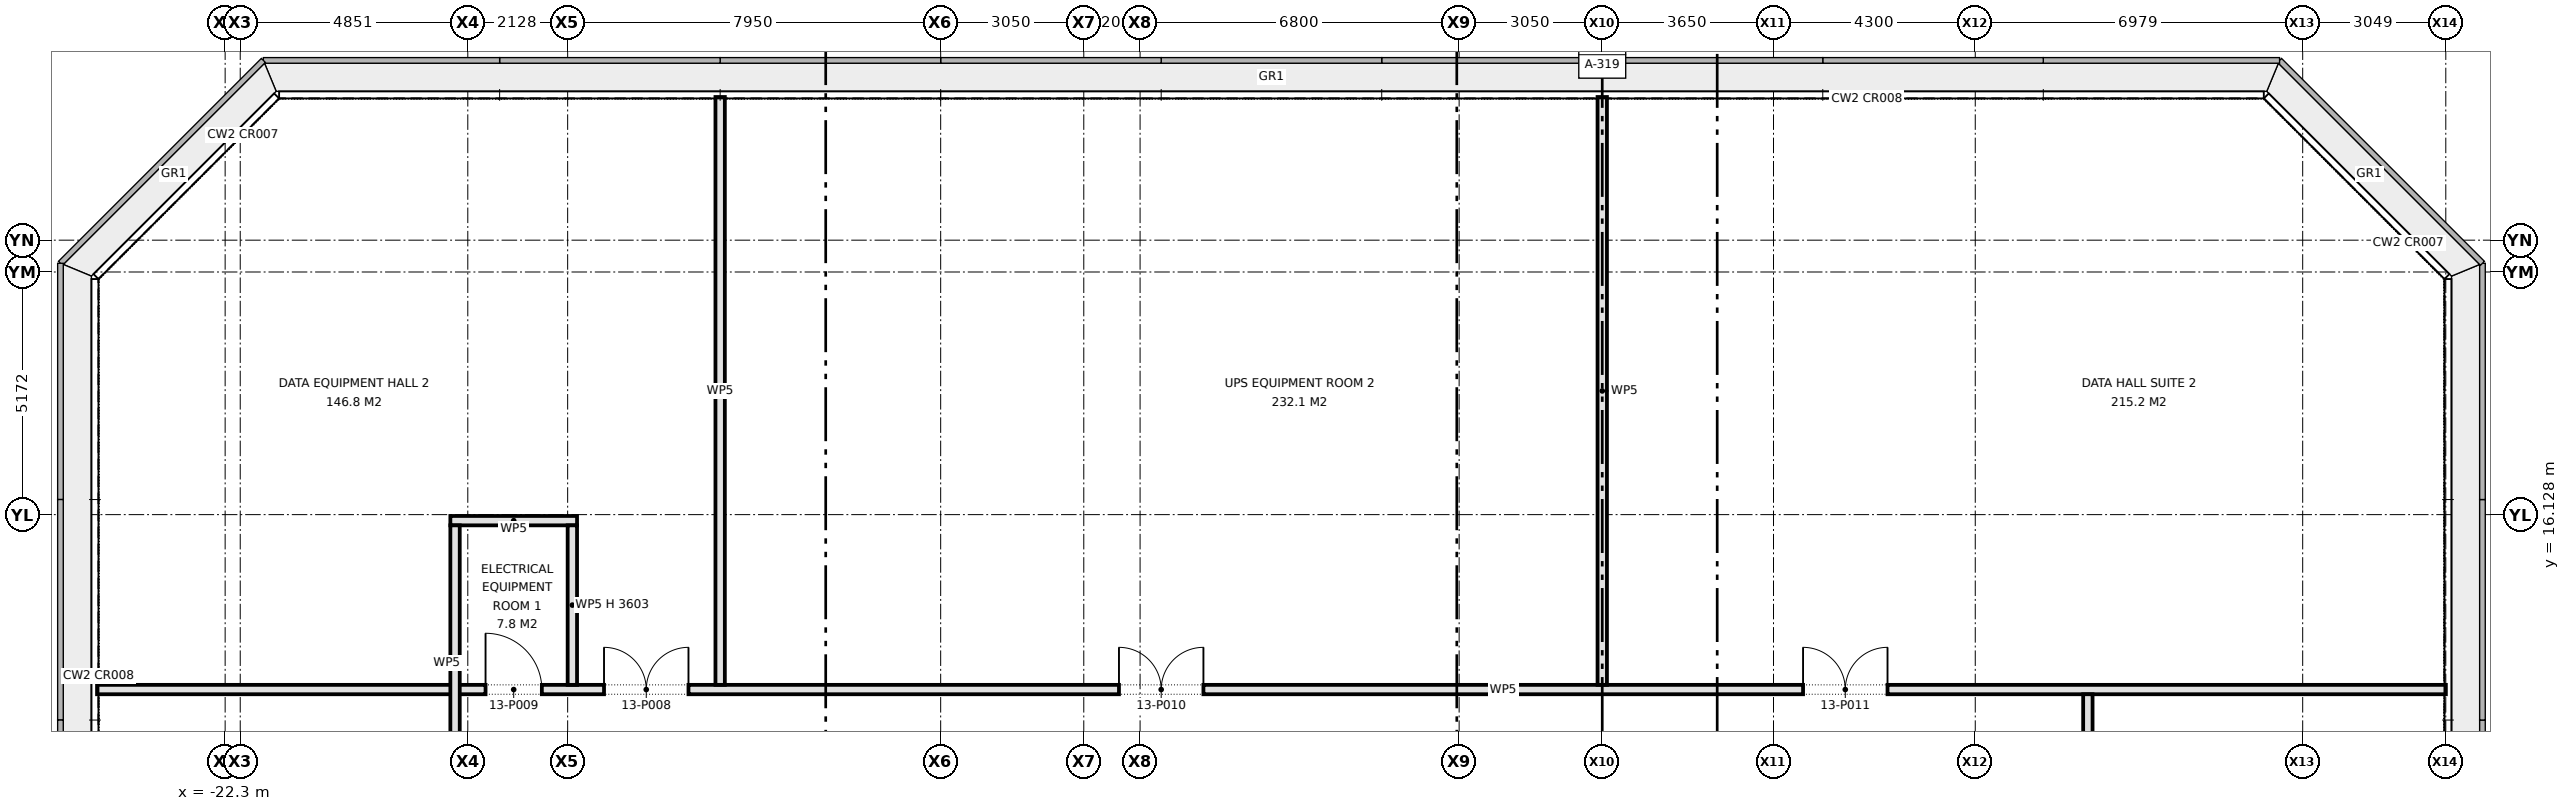
"""IFC4 building model, lengths in metres.
Left out: names, types, materials, properties, quantities, classifications, styles, units other than length and angle.
Written with IfcOpenShell. Run it as: python <this file> out.ifc"""

import sys

from ifc_helpers import new_model, si_unit, direction, frame, frame_2d, origin, place, context, subcontext, project, spatial, rectangle, extrude, element, fill, save


model = new_model("IFC4")
c1 = context("Model", 3, precision=1e-05, world=origin(), true_north=direction((0.0, 1.0)))
c2 = subcontext(c1, "Body", "Model", "MODEL_VIEW")
j1 = project(units=[si_unit("LENGTHUNIT", "METRE"), si_unit("PLANEANGLEUNIT", "RADIAN")], contexts=[c1])
p1 = place(None, origin())
s1 = spatial("IfcSite", under=j1, at=p1, CompositionType="ELEMENT")
p2 = place(p1, origin())
s2 = spatial("IfcBuilding", under=s1, at=p2, CompositionType="ELEMENT")
p3 = place(p2, frame((0.0, 0.0, 59.3)))
s3 = spatial("IfcBuildingStorey", under=s2, at=p3, CompositionType="ELEMENT", Elevation=59.3)
p4 = place(p3, frame((-25.03, 12.4, 0.0), z_axis=(0.0, 0.0, 1.0), x_axis=(1.0, 0.0, 0.0)))
e1 = element("IfcWall", 1, at=p4, inside=s3, PredefinedType="PARTITIONING", context=c2, shape_type="SweptSolid", body=[
    extrude(rectangle(XDim=50.06, YDim=0.2, at=frame_2d((25.03, 0.0))), origin(), (0.0, 0.0, 1.0), 4.55),
])
p5 = place(p4, frame((10.805, 0.0, 0.0)))
e2 = element("IfcOpeningElement", 2, at=p5, cuts=e1, PredefinedType="OPENING", context=c2, shape_type="SweptSolid", body=[
    extrude(rectangle(XDim=1.8, YDim=2.1, at=frame_2d((0.9, 1.05))), frame((0.0, 0.11, 0.0), z_axis=(0.0, -1.0, 0.0), x_axis=(1.0, 0.0, 0.0)), (0.0, 0.0, 1.0), 0.22),
])
p6 = place(p4, frame((8.28, 0.0, 0.0)))
e3 = element("IfcOpeningElement", 3, at=p6, cuts=e1, PredefinedType="OPENING", context=c2, shape_type="SweptSolid", body=[
    extrude(rectangle(XDim=1.2, YDim=2.1, at=frame_2d((0.6, 1.05))), frame((0.0, 0.11, 0.0), z_axis=(0.0, -1.0, 0.0), x_axis=(1.0, 0.0, 0.0)), (0.0, 0.0, 1.0), 0.22),
])
p7 = place(p4, frame((21.78, 0.0, 0.0)))
e4 = element("IfcOpeningElement", 4, at=p7, cuts=e1, PredefinedType="OPENING", context=c2, shape_type="SweptSolid", body=[
    extrude(rectangle(XDim=1.8, YDim=2.1, at=frame_2d((0.9, 1.05))), frame((0.0, 0.11, 0.0), z_axis=(0.0, -1.0, 0.0), x_axis=(1.0, 0.0, 0.0)), (0.0, 0.0, 1.0), 0.22),
])
p8 = place(p4, frame((36.36, 0.0, 0.0)))
e5 = element("IfcOpeningElement", 5, at=p8, cuts=e1, PredefinedType="OPENING", context=c2, shape_type="SweptSolid", body=[
    extrude(rectangle(XDim=1.8, YDim=2.1, at=frame_2d((0.9, 1.05))), frame((0.0, 0.11, 0.0), z_axis=(0.0, -1.0, 0.0), x_axis=(1.0, 0.0, 0.0)), (0.0, 0.0, 1.0), 0.22),
])
p9 = place(p3, frame((-17.5, 16.0, 0.0), z_axis=(0.0, 0.0, 1.0), x_axis=(1.0, 0.0, 0.0)))
e6 = element("IfcWall", 6, at=p9, inside=s3, PredefinedType="PARTITIONING", context=c2, shape_type="SweptSolid", body=[
    extrude(rectangle(XDim=2.7, YDim=0.2, at=frame_2d((1.35, 0.0))), origin(), (0.0, 0.0, 1.0), 4.55),
])
p10 = place(p3, frame((17.4, -12.3, 0.0), z_axis=(0.0, 0.0, 1.0), x_axis=(0.0, 1.0, 0.0)))
e7 = element("IfcWall", 7, at=p10, inside=s3, PredefinedType="PARTITIONING", context=c2, shape_type="SweptSolid", body=[
    extrude(rectangle(XDim=24.6, YDim=0.2, at=frame_2d((12.3, 0.0))), origin(), (0.0, 0.0, 1.0), 4.55),
])
p11 = place(p10, frame((4.025, 0.0, 0.0)))
e8 = element("IfcOpeningElement", 8, at=p11, cuts=e7, PredefinedType="OPENING", context=c2, shape_type="SweptSolid", body=[
    extrude(rectangle(XDim=1.8, YDim=2.1, at=frame_2d((0.9, 1.05))), frame((0.0, 0.11, 0.0), z_axis=(0.0, -1.0, 0.0), x_axis=(1.0, 0.0, 0.0)), (0.0, 0.0, 1.0), 0.22),
])
p12 = place(p10, frame((14.05, 0.0, 0.0)))
e9 = element("IfcOpeningElement", 9, at=p12, cuts=e7, PredefinedType="OPENING", context=c2, shape_type="SweptSolid", body=[
    extrude(rectangle(XDim=1.2, YDim=2.1, at=frame_2d((0.6, 1.05))), frame((0.0, 0.11, 0.0), z_axis=(0.0, -1.0, 0.0), x_axis=(1.0, 0.0, 0.0)), (0.0, 0.0, 1.0), 0.22),
])
p13 = place(p10, frame((21.125, 0.0, 0.0)))
e10 = element("IfcOpeningElement", 10, at=p13, cuts=e7, PredefinedType="OPENING", context=c2, shape_type="SweptSolid", body=[
    extrude(rectangle(XDim=1.8, YDim=2.1, at=frame_2d((0.9, 1.05))), frame((0.0, 0.11, 0.0), z_axis=(0.0, -1.0, 0.0), x_axis=(1.0, 0.0, 0.0)), (0.0, 0.0, 1.0), 0.22),
])
for number, where, z_axis, x_axis in (
    (11, (7.05, 12.5, 0.0), (0.0, 0.0, 1.0), (0.0, 1.0, 0.0)),
    (12, (-11.75, 12.5, 0.0), (0.0, 0.0, 1.0), (0.0, 1.0, 0.0)),
):
    element("IfcWall", number, at=place(p3, frame(where, z_axis=z_axis, x_axis=x_axis)), inside=s3, PredefinedType="PARTITIONING", context=c2, shape_type="SweptSolid", body=[
        extrude(rectangle(XDim=12.53, YDim=0.2, at=frame_2d((6.265, 0.0))), origin(), (0.0, 0.0, 1.0), 4.55),
    ])
p14 = place(p3, frame((-14.9, 12.5, 0.0), z_axis=(0.0, 0.0, 1.0), x_axis=(0.0, 1.0, 0.0)))
e13 = element("IfcWall", 13, at=p14, inside=s3, PredefinedType="PARTITIONING", context=c2, shape_type="SweptSolid", body=[
    extrude(rectangle(XDim=3.4, YDim=0.2, at=frame_2d((1.7, 0.0))), origin(), (0.0, 0.0, 1.0), 3.603),
])
p15 = place(p3, frame((-17.4, -12.3, 0.0), z_axis=(0.0, 0.0, 1.0), x_axis=(0.0, 1.0, 0.0)))
e14 = element("IfcWall", 14, at=p15, inside=s3, PredefinedType="PARTITIONING", context=c2, shape_type="SweptSolid", body=[
    extrude(rectangle(XDim=28.2, YDim=0.2, at=frame_2d((14.1, 0.0))), origin(), (0.0, 0.0, 1.0), 4.55),
])
p16 = place(p15, frame((4.025, 0.0, 0.0)))
e15 = element("IfcOpeningElement", 15, at=p16, cuts=e14, PredefinedType="OPENING", context=c2, shape_type="SweptSolid", body=[
    extrude(rectangle(XDim=1.8, YDim=2.1, at=frame_2d((0.9, 1.05))), frame((0.0, 0.11, 0.0), z_axis=(0.0, -1.0, 0.0), x_axis=(1.0, 0.0, 0.0)), (0.0, 0.0, 1.0), 0.22),
])
p17 = place(p15, frame((20.525, 0.0, 0.0)))
e16 = element("IfcOpeningElement", 16, at=p17, cuts=e14, PredefinedType="OPENING", context=c2, shape_type="SweptSolid", body=[
    extrude(rectangle(XDim=1.8, YDim=2.1, at=frame_2d((0.9, 1.05))), frame((0.0, 0.11, 0.0), z_axis=(0.0, -1.0, 0.0), x_axis=(1.0, 0.0, 0.0)), (0.0, 0.0, 1.0), 0.22),
])
p18 = place(p15, frame((10.95, 0.0, 0.0)))
e17 = element("IfcOpeningElement", 17, at=p18, cuts=e14, PredefinedType="OPENING", context=c2, shape_type="SweptSolid", body=[
    extrude(rectangle(XDim=1.0, YDim=2.1, at=frame_2d((0.5, 1.05))), frame((0.0, 0.11, 0.0), z_axis=(0.0, -1.0, 0.0), x_axis=(1.0, 0.0, 0.0)), (0.0, 0.0, 1.0), 0.22),
])
p19 = place(p15, frame((13.95, 0.0, 0.0)))
e18 = element("IfcOpeningElement", 18, at=p19, cuts=e14, PredefinedType="OPENING", context=c2, shape_type="SweptSolid", body=[
    extrude(rectangle(XDim=1.0, YDim=2.1, at=frame_2d((0.5, 1.05))), frame((0.0, 0.11, 0.0), z_axis=(0.0, -1.0, 0.0), x_axis=(1.0, 0.0, 0.0)), (0.0, 0.0, 1.0), 0.22),
])
p20 = place(p15, frame((16.55, 0.0, 0.0)))
e19 = element("IfcOpeningElement", 19, at=p20, cuts=e14, PredefinedType="OPENING", context=c2, shape_type="SweptSolid", body=[
    extrude(rectangle(XDim=1.0, YDim=2.1, at=frame_2d((0.5, 1.05))), frame((0.0, 0.11, 0.0), z_axis=(0.0, -1.0, 0.0), x_axis=(1.0, 0.0, 0.0)), (0.0, 0.0, 1.0), 0.22),
])
p21 = place(p5, origin())
e20 = element("IfcDoor", 20, at=p21, inside=s3, OperationType="DOUBLE_DOOR_SINGLE_SWING", PredefinedType="DOOR", context=c2, shape_type="SweptSolid", body=[
    extrude(rectangle(XDim=1.8, YDim=2.1, at=frame_2d((0.9, 1.05))), frame((0.0, 0.025, 0.0), z_axis=(0.0, -1.0, 0.0), x_axis=(1.0, 0.0, 0.0)), (0.0, 0.0, 1.0), 0.05),
])
fill(e2, e20)
p22 = place(p6, origin())
e21 = element("IfcDoor", 21, at=p22, inside=s3, OperationType="SINGLE_SWING_LEFT", PredefinedType="DOOR", context=c2, shape_type="SweptSolid", body=[
    extrude(rectangle(XDim=1.2, YDim=2.1, at=frame_2d((0.6, 1.05))), frame((0.0, 0.025, 0.0), z_axis=(0.0, -1.0, 0.0), x_axis=(1.0, 0.0, 0.0)), (0.0, 0.0, 1.0), 0.05),
])
fill(e3, e21)
p23 = place(p7, origin())
e22 = element("IfcDoor", 22, at=p23, inside=s3, OperationType="DOUBLE_DOOR_SINGLE_SWING", PredefinedType="DOOR", context=c2, shape_type="SweptSolid", body=[
    extrude(rectangle(XDim=1.8, YDim=2.1, at=frame_2d((0.9, 1.05))), frame((0.0, 0.025, 0.0), z_axis=(0.0, -1.0, 0.0), x_axis=(1.0, 0.0, 0.0)), (0.0, 0.0, 1.0), 0.05),
])
fill(e4, e22)
p24 = place(p8, origin())
e23 = element("IfcDoor", 23, at=p24, inside=s3, OperationType="DOUBLE_DOOR_SINGLE_SWING", PredefinedType="DOOR", context=c2, shape_type="SweptSolid", body=[
    extrude(rectangle(XDim=1.8, YDim=2.1, at=frame_2d((0.9, 1.05))), frame((0.0, 0.025, 0.0), z_axis=(0.0, -1.0, 0.0), x_axis=(1.0, 0.0, 0.0)), (0.0, 0.0, 1.0), 0.05),
])
fill(e5, e23)
save(model, sys.argv[1])
